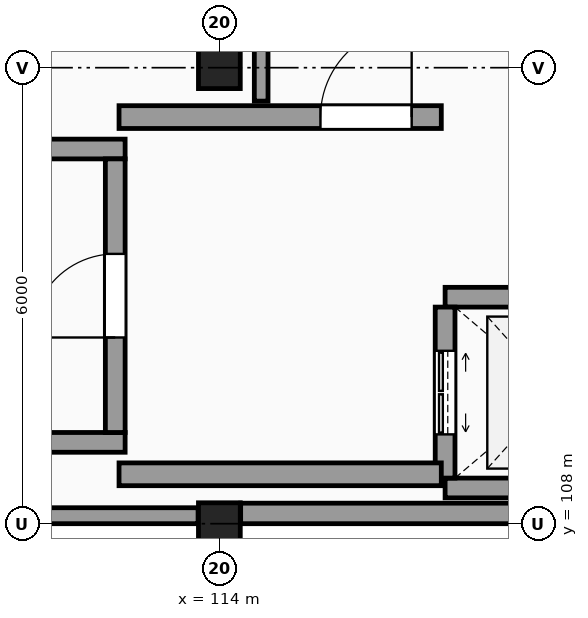
"""IFC4 building model, lengths in metres.
Left out: names, types, materials, properties, quantities, classifications, styles, units other than length and angle.
Written with IfcOpenShell. Run it as: python <this file> out.ifc"""

import sys

from ifc_helpers import new_model, si_unit, direction, frame, frame_2d, origin, origin_2d, place, context, subcontext, project, spatial, rectangle, extrude, element, fill, save


model = new_model("IFC4")
c1 = context("Model", 3, precision=1e-05, world=origin(), true_north=direction((0.0, 1.0)))
c2 = subcontext(c1, "Body", "Model", "MODEL_VIEW")
j1 = project(units=[si_unit("LENGTHUNIT", "METRE"), si_unit("PLANEANGLEUNIT", "RADIAN")], contexts=[c1])
p1 = place(None, origin())
s1 = spatial("IfcSite", under=j1, at=p1, CompositionType="ELEMENT")
p2 = place(p1, origin())
s2 = spatial("IfcBuilding", under=s1, at=p2, CompositionType="ELEMENT")
p3 = place(p2, frame((0.0, 0.0, 28.2)))
s3 = spatial("IfcBuildingStorey", under=s2, at=p3, CompositionType="ELEMENT", Elevation=28.2)
for number, where, z_axis, x_axis in (
    (1, (114.0, 108.0, 0.0), (0.0, 0.0, 1.0), (1.0, 0.0, 0.0)),
    (2, (114.0, 114.0, 0.0), (0.0, 0.0, 1.0), (1.0, 0.0, 0.0)),
):
    element("IfcColumn", number, at=place(p3, frame(where, z_axis=z_axis, x_axis=x_axis)), inside=s3, PredefinedType="COLUMN", context=c2, shape_type="SweptSolid", body=[
        extrude(rectangle(XDim=0.55, YDim=0.55, at=origin_2d()), origin(), (0.0, 0.0, 1.0), 3.3),
    ])
p4 = place(p3, frame((108.305, 108.105, 0.0), z_axis=(0.0, 0.0, 1.0), x_axis=(1.0, 0.0, 0.0)))
e3 = element("IfcWall", 3, at=p4, inside=s3, PredefinedType="SOLIDWALL", context=c2, shape_type="SweptSolid", body=[
    extrude(rectangle(XDim=5.415, YDim=0.21, at=frame_2d((2.708, 0.0))), origin(), (0.0, 0.0, 1.0), 2.43),
])
p5 = place(p3, frame((114.28, 108.135, 0.0), z_axis=(0.0, 0.0, 1.0), x_axis=(1.0, 0.0, 0.0)))
e4 = element("IfcWall", 4, at=p5, inside=s3, PredefinedType="SOLIDWALL", context=c2, shape_type="SweptSolid", body=[
    extrude(rectangle(XDim=5.415, YDim=0.27, at=frame_2d((2.708, 0.0))), origin(), (0.0, 0.0, 1.0), 2.43),
])
for number, where, z_axis, x_axis in (
    (5, (102.04, 109.07, 0.0), (0.0, 0.0, 1.0), (1.0, 0.0, 0.0)),
    (6, (102.04, 112.93, 0.0), (0.0, 0.0, 1.0), (1.0, 0.0, 0.0)),
):
    element("IfcWall", number, at=place(p3, frame(where, z_axis=z_axis, x_axis=x_axis)), inside=s3, PredefinedType="SHEAR", context=c2, shape_type="SweptSolid", body=[
        extrude(rectangle(XDim=10.72, YDim=0.26, at=frame_2d((5.36, 0.0))), origin(), (0.0, 0.0, 1.0), 3.3),
    ])
p6 = place(p3, frame((112.63, 109.2, 0.0), z_axis=(0.0, 0.0, 1.0), x_axis=(0.0, 1.0, 0.0)))
e7 = element("IfcWall", 7, at=p6, inside=s3, PredefinedType="SHEAR", context=c2, shape_type="SweptSolid", body=[
    extrude(rectangle(XDim=3.6, YDim=0.26, at=frame_2d((1.8, 0.0))), origin(), (0.0, 0.0, 1.0), 3.3),
])
p7 = place(p6, frame((1.25, 0.0, 0.0)))
e8 = element("IfcOpeningElement", 8, at=p7, cuts=e7, PredefinedType="OPENING", context=c2, shape_type="SweptSolid", body=[
    extrude(rectangle(XDim=1.1, YDim=2.15, at=frame_2d((0.55, 1.075))), frame((0.0, 0.14, 0.0), z_axis=(0.0, -1.0, 0.0), x_axis=(1.0, 0.0, 0.0)), (0.0, 0.0, 1.0), 0.28),
])
for number, where, z_axis, x_axis in (
    (9, (116.97, 108.47, 0.0), (0.0, 0.0, 1.0), (1.0, 0.0, 0.0)),
    (10, (116.97, 110.98, 0.0), (0.0, 0.0, 1.0), (1.0, 0.0, 0.0)),
):
    element("IfcWall", number, at=place(p3, frame(where, z_axis=z_axis, x_axis=x_axis)), inside=s3, PredefinedType="SHEAR", context=c2, shape_type="SweptSolid", body=[
        extrude(rectangle(XDim=2.91, YDim=0.26, at=frame_2d((1.455, 0.0))), origin(), (0.0, 0.0, 1.0), 3.3),
    ])
p8 = place(p3, frame((116.97, 108.6, 0.0), z_axis=(0.0, 0.0, 1.0), x_axis=(0.0, 1.0, 0.0)))
e11 = element("IfcWall", 11, at=p8, inside=s3, PredefinedType="SHEAR", context=c2, shape_type="SweptSolid", body=[
    extrude(rectangle(XDim=2.25, YDim=0.26, at=frame_2d((1.125, 0.0))), origin(), (0.0, 0.0, 1.0), 3.3),
])
p9 = place(p8, frame((0.575, 0.0, 0.0)))
e12 = element("IfcOpeningElement", 12, at=p9, cuts=e11, PredefinedType="OPENING", context=c2, shape_type="SweptSolid", body=[
    extrude(rectangle(XDim=1.1, YDim=2.2, at=frame_2d((0.55, 1.1))), frame((0.0, 0.14, 0.0), z_axis=(0.0, -1.0, 0.0), x_axis=(1.0, 0.0, 0.0)), (0.0, 0.0, 1.0), 0.28),
])
p10 = place(p3, frame((112.68, 113.35, 0.0), z_axis=(0.0, 0.0, 1.0), x_axis=(1.0, 0.0, 0.0)))
e13 = element("IfcWall", 13, at=p10, inside=s3, PredefinedType="SHEAR", context=c2, shape_type="SweptSolid", body=[
    extrude(rectangle(XDim=4.24, YDim=0.3, at=frame_2d((2.12, 0.0))), origin(), (0.0, 0.0, 1.0), 3.3),
])
p11 = place(p10, frame((2.65, 0.0, 0.0)))
e14 = element("IfcOpeningElement", 14, at=p11, cuts=e13, PredefinedType="OPENING", context=c2, shape_type="SweptSolid", body=[
    extrude(rectangle(XDim=1.2, YDim=2.2, at=frame_2d((0.6, 1.1))), frame((0.0, 0.16, 0.0), z_axis=(0.0, -1.0, 0.0), x_axis=(1.0, 0.0, 0.0)), (0.0, 0.0, 1.0), 0.32),
])
p12 = place(p3, frame((112.68, 108.65, 0.0), z_axis=(0.0, 0.0, 1.0), x_axis=(1.0, 0.0, 0.0)))
e15 = element("IfcWall", 15, at=p12, inside=s3, PredefinedType="SHEAR", context=c2, shape_type="SweptSolid", body=[
    extrude(rectangle(XDim=4.24, YDim=0.3, at=frame_2d((2.12, 0.0))), origin(), (0.0, 0.0, 1.0), 3.3),
])
p13 = place(p3, frame((114.55, 113.56, 0.0), z_axis=(0.0, 0.0, 1.0), x_axis=(0.0, 1.0, 0.0)))
e16 = element("IfcWall", 16, at=p13, inside=s3, PredefinedType="PARTITIONING", context=c2, shape_type="SweptSolid", body=[
    extrude(rectangle(XDim=2.24, YDim=0.18, at=frame_2d((1.12, 0.0))), origin(), (0.0, 0.0, 1.0), 3.08),
])
p14 = place(p7, origin())
e17 = element("IfcDoor", 17, at=p14, inside=s3, OperationType="SINGLE_SWING_LEFT", PredefinedType="DOOR", context=c2, shape_type="SweptSolid", body=[
    extrude(rectangle(XDim=1.1, YDim=2.15, at=frame_2d((0.55, 1.075))), frame((0.0, 0.025, 0.0), z_axis=(0.0, -1.0, 0.0), x_axis=(1.0, 0.0, 0.0)), (0.0, 0.0, 1.0), 0.05),
])
fill(e8, e17)
p15 = place(p9, origin())
e18 = element("IfcDoor", 18, at=p15, inside=s3, OperationType="DOUBLE_DOOR_SLIDING", PredefinedType="DOOR", context=c2, shape_type="SweptSolid", body=[
    extrude(rectangle(XDim=1.1, YDim=2.2, at=frame_2d((0.55, 1.1))), frame((0.0, 0.025, 0.0), z_axis=(0.0, -1.0, 0.0), x_axis=(1.0, 0.0, 0.0)), (0.0, 0.0, 1.0), 0.05),
])
fill(e12, e18)
p16 = place(p11, origin())
e19 = element("IfcDoor", 19, at=p16, inside=s3, OperationType="SINGLE_SWING_RIGHT", PredefinedType="DOOR", context=c2, shape_type="SweptSolid", body=[
    extrude(rectangle(XDim=1.2, YDim=2.2, at=frame_2d((0.6, 1.1))), frame((0.0, 0.025, 0.0), z_axis=(0.0, -1.0, 0.0), x_axis=(1.0, 0.0, 0.0)), (0.0, 0.0, 1.0), 0.05),
])
fill(e14, e19)
save(model, sys.argv[1])
